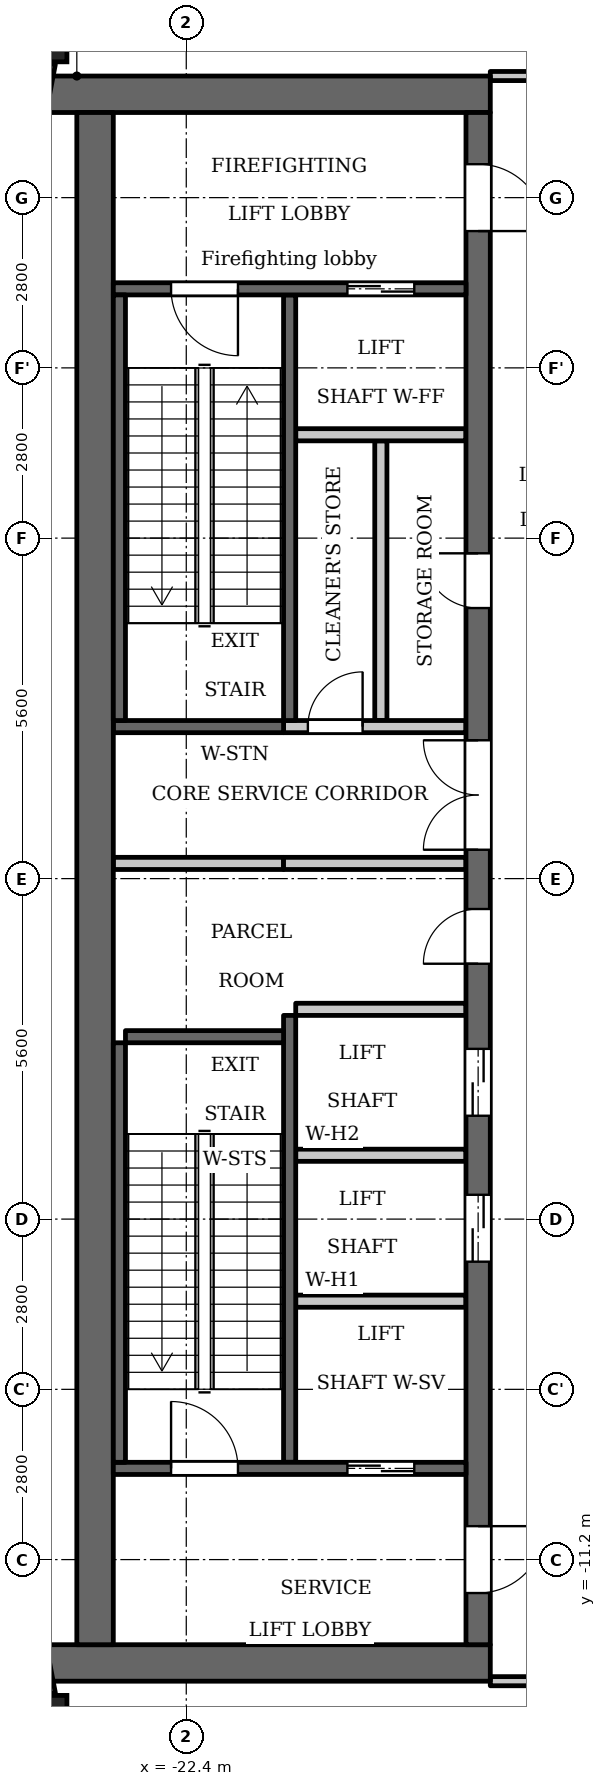
"""IFC4 building model, lengths in metres.
Left out: names, types, materials, properties, quantities, classifications, styles, units other than length and angle.
Written with IfcOpenShell. Run it as: python <this file> out.ifc"""

import sys

from ifc_helpers import new_model, si_unit, direction, frame, frame_2d, origin, origin_2d, place, context, subcontext, project, spatial, rectangle, extrude, element, fill, save


model = new_model("IFC4")
c1 = context("Model", 3, precision=1e-05, world=origin(), true_north=direction((0.0, 1.0)))
c2 = subcontext(c1, "Body", "Model", "MODEL_VIEW")
j1 = project(units=[si_unit("LENGTHUNIT", "METRE"), si_unit("PLANEANGLEUNIT", "RADIAN")], contexts=[c1])
p1 = place(None, origin())
s1 = spatial("IfcSite", under=j1, at=p1, CompositionType="ELEMENT")
p2 = place(p1, origin())
s2 = spatial("IfcBuilding", under=s1, at=p2, CompositionType="ELEMENT")
p3 = place(p2, frame((0.0, 0.0, 289.1)))
s3 = spatial("IfcBuildingStorey", under=s2, at=p3, CompositionType="ELEMENT", Elevation=289.1)
for number, where, z_axis, x_axis in (
    (1, (-24.738, 13.809, 0.0), (0.0, 0.0, 1.0), (1.0, 0.0, 0.0)),
    (2, (-24.738, -13.809, 0.0), (0.0, 0.0, 1.0), (1.0, 0.0, 0.0)),
):
    element("IfcColumn", number, at=place(p3, frame(where, z_axis=z_axis, x_axis=x_axis)), inside=s3, PredefinedType="COLUMN", context=c2, shape_type="SweptSolid", body=[
        extrude(rectangle(XDim=0.75, YDim=0.75, at=origin_2d()), origin(), (0.0, 0.0, 1.0), 5.4),
    ])
for number, where, z_axis, x_axis in (
    (3, (-24.7, 13.42, 0.0), (0.0, 0.0, 1.0), (-0.187, -0.982, 0.0)),
    (4, (-25.053, -11.572, 0.0), (0.0, 0.0, 1.0), (0.187, -0.982, 0.0)),
):
    element("IfcWall", number, at=place(p3, frame(where, z_axis=z_axis, x_axis=x_axis)), inside=s3, PredefinedType="SOLIDWALL", context=c2, shape_type="SweptSolid", body=[
        extrude(rectangle(XDim=1.881, YDim=0.3, at=frame_2d((0.941, 0.0))), origin(), (0.0, 0.0, 1.0), 3.2),
    ])
p4 = place(p3, frame((-20.7, 2.6, 0.0), z_axis=(0.0, 0.0, 1.0), x_axis=(0.0, 1.0, 0.0)))
e5 = element("IfcWall", 5, at=p4, inside=s3, PredefinedType="SHEAR", context=c2, shape_type="SweptSolid", body=[
    extrude(rectangle(XDim=7.0, YDim=0.2, at=frame_2d((3.5, 0.0))), origin(), (0.0, 0.0, 1.0), 5.0),
])
p5 = place(p3, frame((-20.7, -9.6, 0.0), z_axis=(0.0, 0.0, 1.0), x_axis=(0.0, 1.0, 0.0)))
e6 = element("IfcWall", 6, at=p5, inside=s3, PredefinedType="SHEAR", context=c2, shape_type="SweptSolid", body=[
    extrude(rectangle(XDim=7.35, YDim=0.2, at=frame_2d((3.675, 0.0))), origin(), (0.0, 0.0, 1.0), 5.0),
])
p6 = place(p3, frame((-20.8, 2.5, 0.0), z_axis=(0.0, 0.0, 1.0), x_axis=(-1.0, 0.0, 0.0)))
e7 = element("IfcWall", 7, at=p6, inside=s3, PredefinedType="SHEAR", context=c2, shape_type="SweptSolid", body=[
    extrude(rectangle(XDim=2.8, YDim=0.2, at=frame_2d((1.4, 0.0))), origin(), (0.0, 0.0, 1.0), 5.0),
])
p7 = place(p3, frame((-20.8, 0.25, 0.0), z_axis=(0.0, 0.0, 1.0), x_axis=(-1.0, 0.0, 0.0)))
e8 = element("IfcWall", 8, at=p7, inside=s3, PredefinedType="PARTITIONING", context=c2, shape_type="SweptSolid", body=[
    extrude(rectangle(XDim=2.8, YDim=0.2, at=frame_2d((1.4, 0.0))), origin(), (0.0, 0.0, 1.0), 5.0),
])
for number, where, z_axis, x_axis in (
    (9, (-17.4, 12.9, 0.0), (0.0, 0.0, 1.0), (-1.0, 0.0, 0.0)),
    (10, (-17.4, -12.9, 0.0), (0.0, 0.0, 1.0), (-1.0, 0.0, 0.0)),
):
    element("IfcWall", number, at=place(p3, frame(where, z_axis=z_axis, x_axis=x_axis)), inside=s3, PredefinedType="SHEAR", context=c2, shape_type="SweptSolid", body=[
        extrude(rectangle(XDim=7.32, YDim=0.6, at=frame_2d((3.66, 0.0))), origin(), (0.0, 0.0, 1.0), 5.0),
    ])
p8 = place(p3, frame((-19.2, 2.6, 0.0), z_axis=(0.0, 0.0, 1.0), x_axis=(0.0, 1.0, 0.0)))
e11 = element("IfcWall", 11, at=p8, inside=s3, PredefinedType="PARTITIONING", context=c2, shape_type="SweptSolid", body=[
    extrude(rectangle(XDim=4.6, YDim=0.2, at=frame_2d((2.3, 0.0))), origin(), (0.0, 0.0, 1.0), 5.0),
])
p9 = place(p3, frame((-17.6, -12.6, 0.0), z_axis=(0.0, 0.0, 1.0), x_axis=(0.0, 1.0, 0.0)))
e12 = element("IfcWall", 12, at=p9, inside=s3, PredefinedType="SHEAR", context=c2, shape_type="SweptSolid", body=[
    extrude(rectangle(XDim=25.2, YDim=0.4, at=frame_2d((12.6, 0.0))), origin(), (0.0, 0.0, 1.0), 5.0),
])
p10 = place(p9, frame((6.3, 0.0, 0.0)))
e13 = element("IfcOpeningElement", 13, at=p10, cuts=e12, PredefinedType="OPENING", context=c2, shape_type="SweptSolid", body=[
    extrude(rectangle(XDim=1.1, YDim=2.1, at=frame_2d((0.55, 1.05))), frame((0.0, 0.21, 0.0), z_axis=(0.0, -1.0, 0.0), x_axis=(1.0, 0.0, 0.0)), (0.0, 0.0, 1.0), 0.42),
])
p11 = place(p9, frame((8.7, 0.0, 0.0)))
e14 = element("IfcOpeningElement", 14, at=p11, cuts=e12, PredefinedType="OPENING", context=c2, shape_type="SweptSolid", body=[
    extrude(rectangle(XDim=1.1, YDim=2.1, at=frame_2d((0.55, 1.05))), frame((0.0, 0.21, 0.0), z_axis=(0.0, -1.0, 0.0), x_axis=(1.0, 0.0, 0.0)), (0.0, 0.0, 1.0), 0.42),
])
p12 = place(p9, frame((11.2, 0.0, 0.0)))
e15 = element("IfcOpeningElement", 15, at=p12, cuts=e12, PredefinedType="OPENING", context=c2, shape_type="SweptSolid", body=[
    extrude(rectangle(XDim=0.9, YDim=2.1, at=frame_2d((0.45, 1.05))), frame((0.0, 0.21, 0.0), z_axis=(0.0, -1.0, 0.0), x_axis=(1.0, 0.0, 0.0)), (0.0, 0.0, 1.0), 0.42),
])
p13 = place(p9, frame((17.05, 0.0, 0.0)))
e16 = element("IfcOpeningElement", 16, at=p13, cuts=e12, PredefinedType="OPENING", context=c2, shape_type="SweptSolid", body=[
    extrude(rectangle(XDim=0.9, YDim=2.1, at=frame_2d((0.45, 1.05))), frame((0.0, 0.21, 0.0), z_axis=(0.0, -1.0, 0.0), x_axis=(1.0, 0.0, 0.0)), (0.0, 0.0, 1.0), 0.42),
])
p14 = place(p9, frame((23.25, 0.0, 0.0)))
e17 = element("IfcOpeningElement", 17, at=p14, cuts=e12, PredefinedType="OPENING", context=c2, shape_type="SweptSolid", body=[
    extrude(rectangle(XDim=1.1, YDim=2.1, at=frame_2d((0.55, 1.05))), frame((0.0, 0.21, 0.0), z_axis=(0.0, -1.0, 0.0), x_axis=(1.0, 0.0, 0.0)), (0.0, 0.0, 1.0), 0.42),
])
p15 = place(p9, frame((0.85, 0.0, 0.0)))
e18 = element("IfcOpeningElement", 18, at=p15, cuts=e12, PredefinedType="OPENING", context=c2, shape_type="SweptSolid", body=[
    extrude(rectangle(XDim=1.1, YDim=2.1, at=frame_2d((0.55, 1.05))), frame((0.0, 0.21, 0.0), z_axis=(0.0, -1.0, 0.0), x_axis=(1.0, 0.0, 0.0)), (0.0, 0.0, 1.0), 0.42),
])
p16 = place(p9, frame((13.075, 0.0, 0.0)))
e19 = element("IfcOpeningElement", 19, at=p16, cuts=e12, PredefinedType="OPENING", context=c2, shape_type="SweptSolid", body=[
    extrude(rectangle(XDim=1.8, YDim=2.1, at=frame_2d((0.9, 1.05))), frame((0.0, 0.21, 0.0), z_axis=(0.0, -1.0, 0.0), x_axis=(1.0, 0.0, 0.0)), (0.0, 0.0, 1.0), 0.42),
])
p17 = place(p3, frame((-23.9, -12.6, 0.0), z_axis=(0.0, 0.0, 1.0), x_axis=(0.0, 1.0, 0.0)))
e20 = element("IfcWall", 20, at=p17, inside=s3, PredefinedType="SHEAR", context=c2, shape_type="SweptSolid", body=[
    extrude(rectangle(XDim=25.2, YDim=0.6, at=frame_2d((12.6, 0.0))), origin(), (0.0, 0.0, 1.0), 5.0),
])
p18 = place(p3, frame((-17.8, -9.7, 0.0), z_axis=(0.0, 0.0, 1.0), x_axis=(-1.0, 0.0, 0.0)))
e21 = element("IfcWall", 21, at=p18, inside=s3, PredefinedType="SHEAR", context=c2, shape_type="SweptSolid", body=[
    extrude(rectangle(XDim=5.8, YDim=0.2, at=frame_2d((2.9, 0.0))), origin(), (0.0, 0.0, 1.0), 5.0),
])
p19 = place(p18, frame((0.85, 0.0, 0.0)))
e22 = element("IfcOpeningElement", 22, at=p19, cuts=e21, PredefinedType="OPENING", context=c2, shape_type="SweptSolid", body=[
    extrude(rectangle(XDim=1.1, YDim=2.1, at=frame_2d((0.55, 1.05))), frame((0.0, 0.11, 0.0), z_axis=(0.0, -1.0, 0.0), x_axis=(1.0, 0.0, 0.0)), (0.0, 0.0, 1.0), 0.22),
])
p20 = place(p18, frame((3.75, 0.0, 0.0)))
e23 = element("IfcOpeningElement", 23, at=p20, cuts=e21, PredefinedType="OPENING", context=c2, shape_type="SweptSolid", body=[
    extrude(rectangle(XDim=1.1, YDim=2.1, at=frame_2d((0.55, 1.05))), frame((0.0, 0.11, 0.0), z_axis=(0.0, -1.0, 0.0), x_axis=(1.0, 0.0, 0.0)), (0.0, 0.0, 1.0), 0.22),
])
for number, where, z_axis, x_axis in (
    (24, (-17.8, -6.95, 0.0), (0.0, 0.0, 1.0), (-1.0, 0.0, 0.0)),
    (25, (-17.8, -4.55, 0.0), (0.0, 0.0, 1.0), (-1.0, 0.0, 0.0)),
    (26, (-17.8, -2.15, 0.0), (0.0, 0.0, 1.0), (-1.0, 0.0, 0.0)),
):
    element("IfcWall", number, at=place(p3, frame(where, z_axis=z_axis, x_axis=x_axis)), inside=s3, PredefinedType="PARTITIONING", context=c2, shape_type="SweptSolid", body=[
        extrude(rectangle(XDim=2.8, YDim=0.2, at=frame_2d((1.4, 0.0))), origin(), (0.0, 0.0, 1.0), 5.0),
    ])
p21 = place(p3, frame((-17.8, 0.25, 0.0), z_axis=(0.0, 0.0, 1.0), x_axis=(-1.0, 0.0, 0.0)))
e27 = element("IfcWall", 27, at=p21, inside=s3, PredefinedType="PARTITIONING", context=c2, shape_type="SweptSolid", body=[
    extrude(rectangle(XDim=3.0, YDim=0.2, at=frame_2d((1.5, 0.0))), origin(), (0.0, 0.0, 1.0), 5.0),
])
p22 = place(p3, frame((-17.8, 2.5, 0.0), z_axis=(0.0, 0.0, 1.0), x_axis=(-1.0, 0.0, 0.0)))
e28 = element("IfcWall", 28, at=p22, inside=s3, PredefinedType="PARTITIONING", context=c2, shape_type="SweptSolid", body=[
    extrude(rectangle(XDim=3.0, YDim=0.2, at=frame_2d((1.5, 0.0))), origin(), (0.0, 0.0, 1.0), 5.0),
])
p23 = place(p22, frame((1.7, 0.0, 0.0)))
e29 = element("IfcOpeningElement", 29, at=p23, cuts=e28, PredefinedType="OPENING", context=c2, shape_type="SweptSolid", body=[
    extrude(rectangle(XDim=0.9, YDim=2.1, at=frame_2d((0.45, 1.05))), frame((0.0, 0.11, 0.0), z_axis=(0.0, -1.0, 0.0), x_axis=(1.0, 0.0, 0.0)), (0.0, 0.0, 1.0), 0.22),
])
p24 = place(p3, frame((-17.8, 7.3, 0.0), z_axis=(0.0, 0.0, 1.0), x_axis=(-1.0, 0.0, 0.0)))
e30 = element("IfcWall", 30, at=p24, inside=s3, PredefinedType="PARTITIONING", context=c2, shape_type="SweptSolid", body=[
    extrude(rectangle(XDim=2.8, YDim=0.2, at=frame_2d((1.4, 0.0))), origin(), (0.0, 0.0, 1.0), 5.0),
])
p25 = place(p3, frame((-17.8, 9.7, 0.0), z_axis=(0.0, 0.0, 1.0), x_axis=(-1.0, 0.0, 0.0)))
e31 = element("IfcWall", 31, at=p25, inside=s3, PredefinedType="SHEAR", context=c2, shape_type="SweptSolid", body=[
    extrude(rectangle(XDim=5.8, YDim=0.2, at=frame_2d((2.9, 0.0))), origin(), (0.0, 0.0, 1.0), 5.0),
])
p26 = place(p25, frame((0.85, 0.0, 0.0)))
e32 = element("IfcOpeningElement", 32, at=p26, cuts=e31, PredefinedType="OPENING", context=c2, shape_type="SweptSolid", body=[
    extrude(rectangle(XDim=1.1, YDim=2.1, at=frame_2d((0.55, 1.05))), frame((0.0, 0.11, 0.0), z_axis=(0.0, -1.0, 0.0), x_axis=(1.0, 0.0, 0.0)), (0.0, 0.0, 1.0), 0.22),
])
p27 = place(p25, frame((3.75, 0.0, 0.0)))
e33 = element("IfcOpeningElement", 33, at=p27, cuts=e31, PredefinedType="OPENING", context=c2, shape_type="SweptSolid", body=[
    extrude(rectangle(XDim=1.1, YDim=2.1, at=frame_2d((0.55, 1.05))), frame((0.0, 0.11, 0.0), z_axis=(0.0, -1.0, 0.0), x_axis=(1.0, 0.0, 0.0)), (0.0, 0.0, 1.0), 0.22),
])
p28 = place(p3, frame((-23.5, 2.6, 0.0), z_axis=(0.0, 0.0, 1.0), x_axis=(0.0, 1.0, 0.0)))
e34 = element("IfcWall", 34, at=p28, inside=s3, PredefinedType="SHEAR", context=c2, shape_type="SweptSolid", body=[
    extrude(rectangle(XDim=7.0, YDim=0.2, at=frame_2d((3.5, 0.0))), origin(), (0.0, 0.0, 1.0), 5.0),
])
p29 = place(p3, frame((-23.5, -9.6, 0.0), z_axis=(0.0, 0.0, 1.0), x_axis=(0.0, 1.0, 0.0)))
e35 = element("IfcWall", 35, at=p29, inside=s3, PredefinedType="SHEAR", context=c2, shape_type="SweptSolid", body=[
    extrude(rectangle(XDim=6.9, YDim=0.2, at=frame_2d((3.45, 0.0))), origin(), (0.0, 0.0, 1.0), 5.0),
])
p30 = place(p3, frame((-20.8, -2.6, 0.0), z_axis=(0.0, 0.0, 1.0), x_axis=(-1.0, 0.0, 0.0)))
e36 = element("IfcWall", 36, at=p30, inside=s3, PredefinedType="SHEAR", context=c2, shape_type="SweptSolid", body=[
    extrude(rectangle(XDim=2.6, YDim=0.2, at=frame_2d((1.3, 0.0))), origin(), (0.0, 0.0, 1.0), 5.0),
])
p31 = place(p3, frame((-17.4, -13.2, 0.0), z_axis=(0.0, 0.0, 1.0), x_axis=(1.0, 0.0, 0.0)))
e37 = element("IfcWall", 37, at=p31, inside=s3, PredefinedType="PARTITIONING", context=c2, shape_type="SweptSolid", body=[
    extrude(rectangle(XDim=34.8, YDim=0.15, at=frame_2d((17.4, 0.0))), origin(), (0.0, 0.0, 1.0), 5.0),
])
p32 = place(p31, frame((0.65, 0.0, 0.0)))
e38 = element("IfcOpeningElement", 38, at=p32, cuts=e37, PredefinedType="OPENING", context=c2, shape_type="SweptSolid", body=[
    extrude(rectangle(XDim=1.0, YDim=2.1, at=frame_2d((0.5, 1.05))), frame((0.0, 0.085, 0.0), z_axis=(0.0, -1.0, 0.0), x_axis=(1.0, 0.0, 0.0)), (0.0, 0.0, 1.0), 0.17),
])
p33 = place(p31, frame((33.05, 0.0, 0.0)))
e39 = element("IfcOpeningElement", 39, at=p33, cuts=e37, PredefinedType="OPENING", context=c2, shape_type="SweptSolid", body=[
    extrude(rectangle(XDim=1.0, YDim=2.1, at=frame_2d((0.5, 1.05))), frame((0.0, 0.085, 0.0), z_axis=(0.0, -1.0, 0.0), x_axis=(1.0, 0.0, 0.0)), (0.0, 0.0, 1.0), 0.17),
])
p34 = place(p31, frame((6.75, 0.0, 0.0)))
e40 = element("IfcOpeningElement", 40, at=p34, cuts=e37, PredefinedType="OPENING", context=c2, shape_type="SweptSolid", body=[
    extrude(rectangle(XDim=1.0, YDim=2.1, at=frame_2d((0.5, 1.05))), frame((0.0, 0.085, 0.0), z_axis=(0.0, -1.0, 0.0), x_axis=(1.0, 0.0, 0.0)), (0.0, 0.0, 1.0), 0.17),
])
p35 = place(p31, frame((9.0, 0.0, 0.0)))
e41 = element("IfcOpeningElement", 41, at=p35, cuts=e37, PredefinedType="OPENING", context=c2, shape_type="SweptSolid", body=[
    extrude(rectangle(XDim=1.0, YDim=2.1, at=frame_2d((0.5, 1.05))), frame((0.0, 0.085, 0.0), z_axis=(0.0, -1.0, 0.0), x_axis=(1.0, 0.0, 0.0)), (0.0, 0.0, 1.0), 0.17),
])
p36 = place(p31, frame((30.55, 0.0, 0.0)))
e42 = element("IfcOpeningElement", 42, at=p36, cuts=e37, PredefinedType="OPENING", context=c2, shape_type="SweptSolid", body=[
    extrude(rectangle(XDim=1.2, YDim=2.1, at=frame_2d((0.6, 1.05))), frame((0.0, 0.085, 0.0), z_axis=(0.0, -1.0, 0.0), x_axis=(1.0, 0.0, 0.0)), (0.0, 0.0, 1.0), 0.17),
])
p37 = place(p3, frame((-17.4, 13.2, 0.0), z_axis=(0.0, 0.0, 1.0), x_axis=(1.0, 0.0, 0.0)))
e43 = element("IfcWall", 43, at=p37, inside=s3, PredefinedType="PARTITIONING", context=c2, shape_type="SweptSolid", body=[
    extrude(rectangle(XDim=34.8, YDim=0.15, at=frame_2d((17.4, 0.0))), origin(), (0.0, 0.0, 1.0), 5.0),
])
p38 = place(p37, frame((0.75, 0.0, 0.0)))
e44 = element("IfcOpeningElement", 44, at=p38, cuts=e43, PredefinedType="OPENING", context=c2, shape_type="SweptSolid", body=[
    extrude(rectangle(XDim=1.0, YDim=2.1, at=frame_2d((0.5, 1.05))), frame((0.0, 0.085, 0.0), z_axis=(0.0, -1.0, 0.0), x_axis=(1.0, 0.0, 0.0)), (0.0, 0.0, 1.0), 0.17),
])
p39 = place(p37, frame((33.15, 0.0, 0.0)))
e45 = element("IfcOpeningElement", 45, at=p39, cuts=e43, PredefinedType="OPENING", context=c2, shape_type="SweptSolid", body=[
    extrude(rectangle(XDim=1.0, YDim=2.1, at=frame_2d((0.5, 1.05))), frame((0.0, 0.085, 0.0), z_axis=(0.0, -1.0, 0.0), x_axis=(1.0, 0.0, 0.0)), (0.0, 0.0, 1.0), 0.17),
])
p40 = place(p37, frame((3.05, 0.0, 0.0)))
e46 = element("IfcOpeningElement", 46, at=p40, cuts=e43, PredefinedType="OPENING", context=c2, shape_type="SweptSolid", body=[
    extrude(rectangle(XDim=1.2, YDim=2.1, at=frame_2d((0.6, 1.05))), frame((0.0, 0.085, 0.0), z_axis=(0.0, -1.0, 0.0), x_axis=(1.0, 0.0, 0.0)), (0.0, 0.0, 1.0), 0.17),
])
p41 = place(p37, frame((30.8, 0.0, 0.0)))
e47 = element("IfcOpeningElement", 47, at=p41, cuts=e43, PredefinedType="OPENING", context=c2, shape_type="SweptSolid", body=[
    extrude(rectangle(XDim=1.0, YDim=2.1, at=frame_2d((0.5, 1.05))), frame((0.0, 0.085, 0.0), z_axis=(0.0, -1.0, 0.0), x_axis=(1.0, 0.0, 0.0)), (0.0, 0.0, 1.0), 0.17),
])
p42 = place(p19, origin())
e48 = element("IfcDoor", 48, at=p42, inside=s3, OperationType="DOUBLE_DOOR_SLIDING", PredefinedType="DOOR", context=c2, shape_type="SweptSolid", body=[
    extrude(rectangle(XDim=1.1, YDim=2.1, at=frame_2d((0.55, 1.05))), frame((0.0, 0.025, 0.0), z_axis=(0.0, -1.0, 0.0), x_axis=(1.0, 0.0, 0.0)), (0.0, 0.0, 1.0), 0.05),
])
fill(e22, e48)
p43 = place(p10, origin())
e49 = element("IfcDoor", 49, at=p43, inside=s3, OperationType="DOUBLE_DOOR_SLIDING", PredefinedType="DOOR", context=c2, shape_type="SweptSolid", body=[
    extrude(rectangle(XDim=1.1, YDim=2.1, at=frame_2d((0.55, 1.05))), frame((0.0, 0.025, 0.0), z_axis=(0.0, -1.0, 0.0), x_axis=(1.0, 0.0, 0.0)), (0.0, 0.0, 1.0), 0.05),
])
fill(e13, e49)
p44 = place(p11, origin())
e50 = element("IfcDoor", 50, at=p44, inside=s3, OperationType="DOUBLE_DOOR_SLIDING", PredefinedType="DOOR", context=c2, shape_type="SweptSolid", body=[
    extrude(rectangle(XDim=1.1, YDim=2.1, at=frame_2d((0.55, 1.05))), frame((0.0, 0.025, 0.0), z_axis=(0.0, -1.0, 0.0), x_axis=(1.0, 0.0, 0.0)), (0.0, 0.0, 1.0), 0.05),
])
fill(e14, e50)
p45 = place(p12, origin())
e51 = element("IfcDoor", 51, at=p45, inside=s3, OperationType="SINGLE_SWING_RIGHT", PredefinedType="DOOR", context=c2, shape_type="SweptSolid", body=[
    extrude(rectangle(XDim=0.9, YDim=2.1, at=frame_2d((0.45, 1.05))), frame((0.0, 0.025, 0.0), z_axis=(0.0, -1.0, 0.0), x_axis=(1.0, 0.0, 0.0)), (0.0, 0.0, 1.0), 0.05),
])
fill(e15, e51)
p46 = place(p13, origin())
e52 = element("IfcDoor", 52, at=p46, inside=s3, OperationType="SINGLE_SWING_LEFT", PredefinedType="DOOR", context=c2, shape_type="SweptSolid", body=[
    extrude(rectangle(XDim=0.9, YDim=2.1, at=frame_2d((0.45, 1.05))), frame((0.0, 0.025, 0.0), z_axis=(0.0, -1.0, 0.0), x_axis=(1.0, 0.0, 0.0)), (0.0, 0.0, 1.0), 0.05),
])
fill(e16, e52)
p47 = place(p23, origin())
e53 = element("IfcDoor", 53, at=p47, inside=s3, OperationType="SINGLE_SWING_LEFT", PredefinedType="DOOR", context=c2, shape_type="SweptSolid", body=[
    extrude(rectangle(XDim=0.9, YDim=2.1, at=frame_2d((0.45, 1.05))), frame((0.0, 0.025, 0.0), z_axis=(0.0, -1.0, 0.0), x_axis=(1.0, 0.0, 0.0)), (0.0, 0.0, 1.0), 0.05),
])
fill(e29, e53)
p48 = place(p26, origin())
e54 = element("IfcDoor", 54, at=p48, inside=s3, OperationType="DOUBLE_DOOR_SLIDING", PredefinedType="DOOR", context=c2, shape_type="SweptSolid", body=[
    extrude(rectangle(XDim=1.1, YDim=2.1, at=frame_2d((0.55, 1.05))), frame((0.0, 0.025, 0.0), z_axis=(0.0, -1.0, 0.0), x_axis=(1.0, 0.0, 0.0)), (0.0, 0.0, 1.0), 0.05),
])
fill(e32, e54)
p49 = place(p14, origin())
e55 = element("IfcDoor", 55, at=p49, inside=s3, OperationType="SINGLE_SWING_LEFT", PredefinedType="DOOR", context=c2, shape_type="SweptSolid", body=[
    extrude(rectangle(XDim=1.1, YDim=2.1, at=frame_2d((0.55, 1.05))), frame((0.0, 0.025, 0.0), z_axis=(0.0, -1.0, 0.0), x_axis=(1.0, 0.0, 0.0)), (0.0, 0.0, 1.0), 0.05),
])
fill(e17, e55)
p50 = place(p15, origin())
e56 = element("IfcDoor", 56, at=p50, inside=s3, OperationType="SINGLE_SWING_RIGHT", PredefinedType="DOOR", context=c2, shape_type="SweptSolid", body=[
    extrude(rectangle(XDim=1.1, YDim=2.1, at=frame_2d((0.55, 1.05))), frame((0.0, 0.025, 0.0), z_axis=(0.0, -1.0, 0.0), x_axis=(1.0, 0.0, 0.0)), (0.0, 0.0, 1.0), 0.05),
])
fill(e18, e56)
p51 = place(p27, origin())
e57 = element("IfcDoor", 57, at=p51, inside=s3, OperationType="SINGLE_SWING_RIGHT", PredefinedType="DOOR", context=c2, shape_type="SweptSolid", body=[
    extrude(rectangle(XDim=1.1, YDim=2.1, at=frame_2d((0.55, 1.05))), frame((0.0, 0.025, 0.0), z_axis=(0.0, -1.0, 0.0), x_axis=(1.0, 0.0, 0.0)), (0.0, 0.0, 1.0), 0.05),
])
fill(e33, e57)
p52 = place(p20, origin())
e58 = element("IfcDoor", 58, at=p52, inside=s3, OperationType="SINGLE_SWING_RIGHT", PredefinedType="DOOR", context=c2, shape_type="SweptSolid", body=[
    extrude(rectangle(XDim=1.1, YDim=2.1, at=frame_2d((0.55, 1.05))), frame((0.0, 0.025, 0.0), z_axis=(0.0, -1.0, 0.0), x_axis=(1.0, 0.0, 0.0)), (0.0, 0.0, 1.0), 0.05),
])
fill(e23, e58)
p53 = place(p16, origin())
e59 = element("IfcDoor", 59, at=p53, inside=s3, OperationType="DOUBLE_DOOR_SINGLE_SWING", PredefinedType="DOOR", context=c2, shape_type="SweptSolid", body=[
    extrude(rectangle(XDim=1.8, YDim=2.1, at=frame_2d((0.9, 1.05))), frame((0.0, 0.025, 0.0), z_axis=(0.0, -1.0, 0.0), x_axis=(1.0, 0.0, 0.0)), (0.0, 0.0, 1.0), 0.05),
])
fill(e19, e59)
save(model, sys.argv[1])
